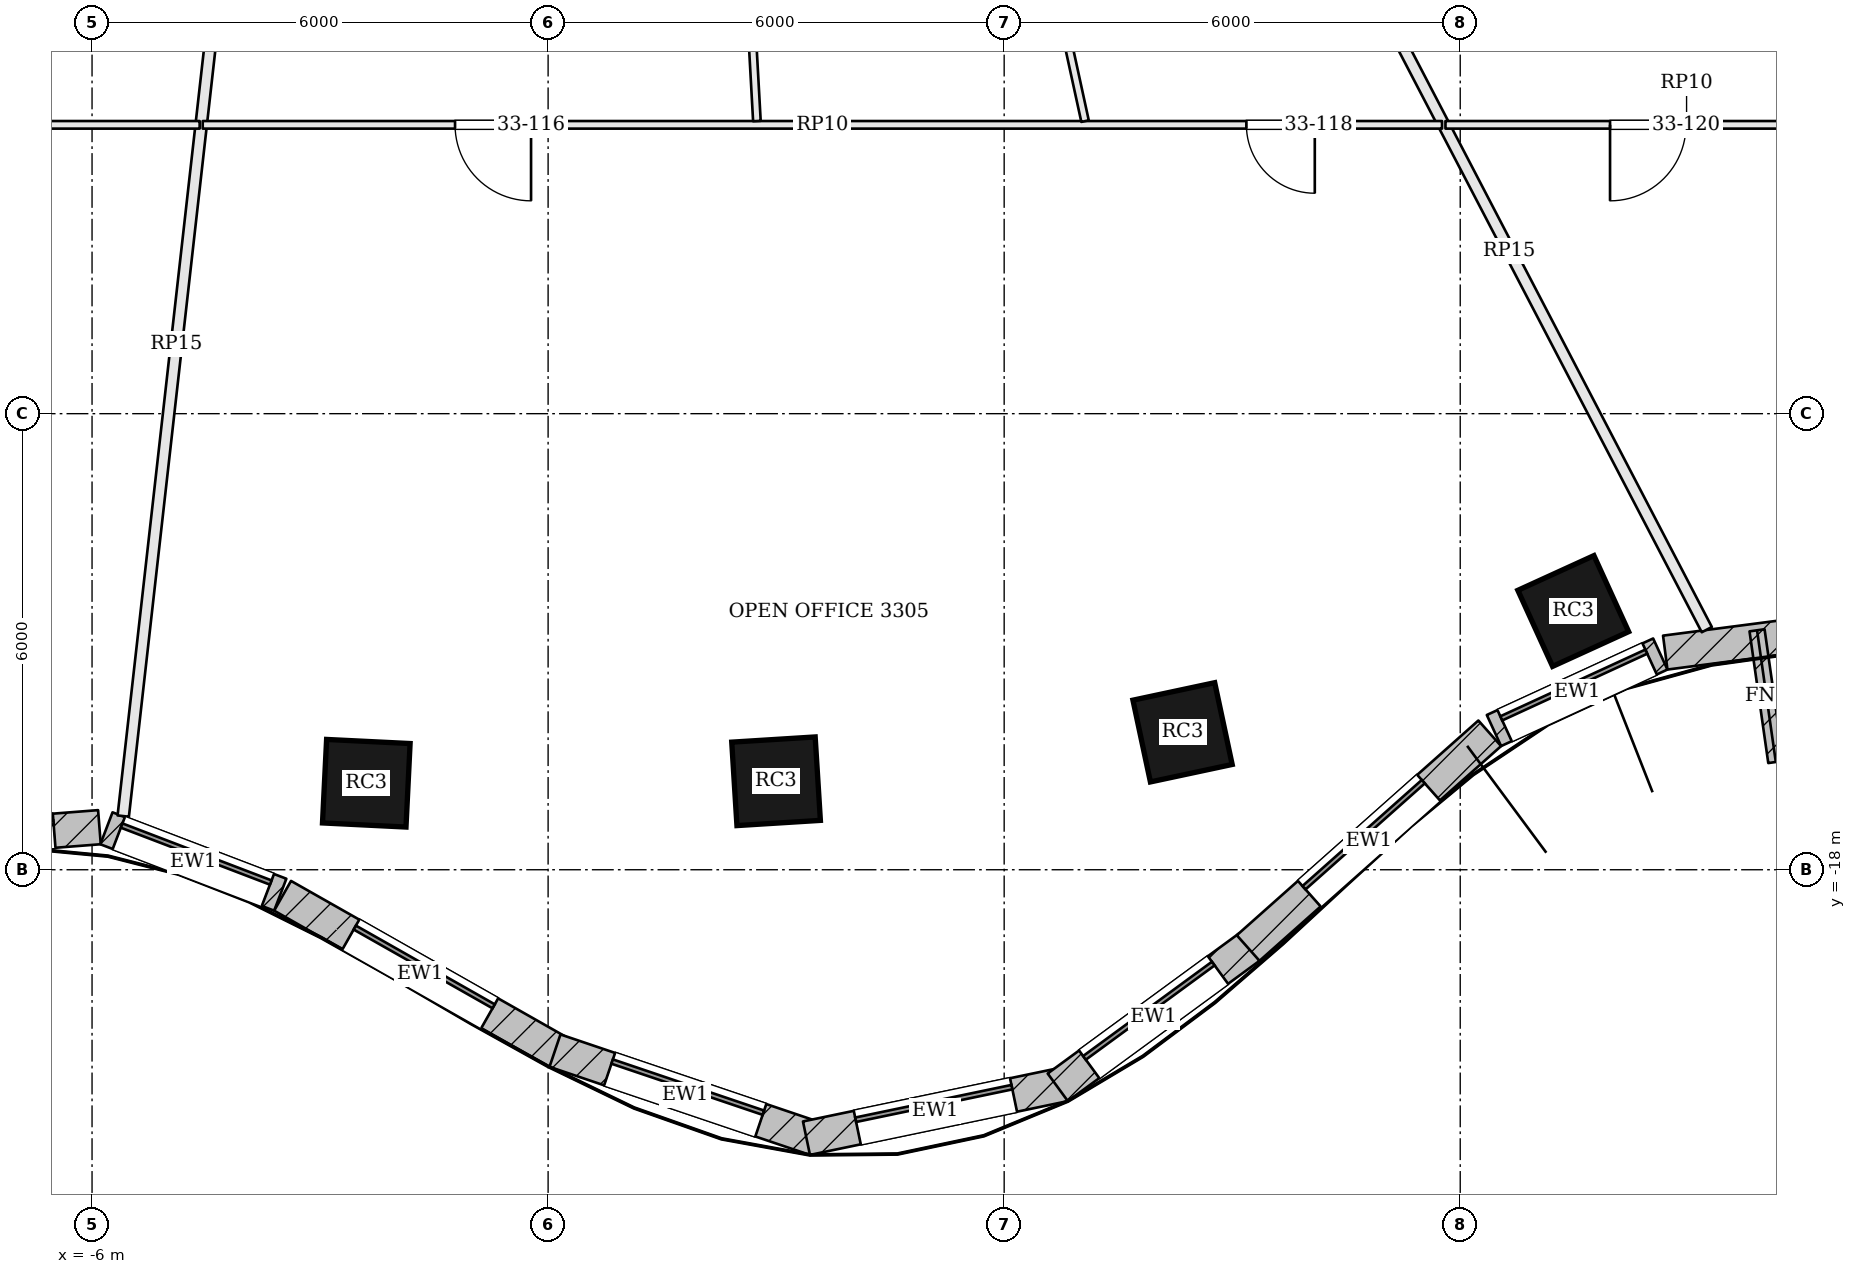
"""IFC4 building model, lengths in metres.
Left out: names, types, materials, properties, quantities, classifications, styles, units other than length and angle.
Written with IfcOpenShell. Run it as: python <this file> out.ifc"""

import sys

from ifc_helpers import new_model, si_unit, direction, frame, frame_2d, origin, origin_2d, place, context, subcontext, project, spatial, rectangle, extrude, element, fill, save


model = new_model("IFC4")
c1 = context("Model", 3, precision=1e-05, world=origin(), true_north=direction((0.0, 1.0)))
c2 = subcontext(c1, "Body", "Model", "MODEL_VIEW")
j1 = project(units=[si_unit("LENGTHUNIT", "METRE"), si_unit("PLANEANGLEUNIT", "RADIAN")], contexts=[c1])
p1 = place(None, origin())
s1 = spatial("IfcSite", under=j1, at=p1, CompositionType="ELEMENT")
p2 = place(p1, origin())
s2 = spatial("IfcBuilding", under=s1, at=p2, CompositionType="ELEMENT")
p3 = place(p2, frame((0.0, 0.0, 138.3)))
s3 = spatial("IfcBuildingStorey", under=s2, at=p3, CompositionType="ELEMENT", Elevation=138.3)
for number, where, z_axis, x_axis in (
    (1, (-2.392, -16.862, 0.0), (0.0, 0.0, 1.0), (0.999, -0.049, 0.0)),
    (2, (2.999, -16.836, 0.0), (0.0, 0.0, 1.0), (0.998, 0.062, 0.0)),
    (3, (8.347, -16.192, 0.0), (0.0, 0.0, 1.0), (0.978, 0.209, 0.0)),
    (4, (13.487, -14.596, 0.0), (0.0, 0.0, 1.0), (0.91, 0.415, 0.0)),
):
    element("IfcColumn", number, at=place(p3, frame(where, z_axis=z_axis, x_axis=x_axis)), inside=s3, PredefinedType="COLUMN", context=c2, shape_type="SweptSolid", body=[
        extrude(rectangle(XDim=1.1, YDim=1.1, at=origin_2d()), origin(), (0.0, 0.0, 1.0), 3.9),
    ])
p4 = place(p3, frame((-9.188, -17.697, 0.0), z_axis=(0.0, 0.0, 1.0), x_axis=(0.996964028691, 0.077863505548, 0.0)))
e5 = element("IfcWall", 5, at=p4, inside=s3, PredefinedType="SOLIDWALL", context=c2, shape_type="SweptSolid", body=[
    extrude(rectangle(XDim=3.295, YDim=0.45, at=frame_2d((1.648, 0.0))), origin(), (0.0, 0.0, 1.0), 3.7),
])
p5 = place(p4, frame((0.598, 0.0, 0.9)))
e6 = element("IfcOpeningElement", 6, at=p5, cuts=e5, PredefinedType="OPENING", context=c2, shape_type="SweptSolid", body=[
    extrude(rectangle(XDim=2.1, YDim=2.3, at=frame_2d((1.05, 1.15))), frame((0.0, 0.235, 0.0), z_axis=(0.0, -1.0, 0.0), x_axis=(1.0, 0.0, 0.0)), (0.0, 0.0, 1.0), 0.47),
])
p6 = place(p3, frame((-5.811, -17.455, 0.0), z_axis=(0.0, 0.0, 1.0), x_axis=(0.934122271306, -0.35695319336, 0.0)))
e7 = element("IfcWall", 7, at=p6, inside=s3, PredefinedType="SOLIDWALL", context=c2, shape_type="SweptSolid", body=[
    extrude(rectangle(XDim=2.448, YDim=0.45, at=frame_2d((1.224, 0.0))), origin(), (0.0, 0.0, 1.0), 3.7),
])
p7 = place(p6, frame((0.174, 0.0, 0.9)))
e8 = element("IfcOpeningElement", 8, at=p7, cuts=e7, PredefinedType="OPENING", context=c2, shape_type="SweptSolid", body=[
    extrude(rectangle(XDim=2.1, YDim=2.3, at=frame_2d((1.05, 1.15))), frame((0.0, 0.235, 0.0), z_axis=(0.0, -1.0, 0.0), x_axis=(1.0, 0.0, 0.0)), (0.0, 0.0, 1.0), 0.47),
])
p8 = place(p3, frame((-3.493, -18.343, 0.0), z_axis=(0.0, 0.0, 1.0), x_axis=(0.869825988853, -0.493358641473, 0.0)))
e9 = element("IfcWall", 9, at=p8, inside=s3, PredefinedType="SOLIDWALL", context=c2, shape_type="SweptSolid", body=[
    extrude(rectangle(XDim=4.165, YDim=0.45, at=frame_2d((2.083, 0.0))), origin(), (0.0, 0.0, 1.0), 3.7),
])
p9 = place(p8, frame((1.032, 0.0, 0.9)))
e10 = element("IfcOpeningElement", 10, at=p9, cuts=e9, PredefinedType="OPENING", context=c2, shape_type="SweptSolid", body=[
    extrude(rectangle(XDim=2.1, YDim=2.3, at=frame_2d((1.05, 1.15))), frame((0.0, 0.235, 0.0), z_axis=(0.0, -1.0, 0.0), x_axis=(1.0, 0.0, 0.0)), (0.0, 0.0, 1.0), 0.47),
])
p10 = place(p3, frame((0.091, -20.38, 0.0), z_axis=(0.0, 0.0, 1.0), x_axis=(0.947304227221, -0.320335294791, 0.0)))
e11 = element("IfcWall", 11, at=p10, inside=s3, PredefinedType="SOLIDWALL", context=c2, shape_type="SweptSolid", body=[
    extrude(rectangle(XDim=3.617, YDim=0.45, at=frame_2d((1.809, 0.0))), origin(), (0.0, 0.0, 1.0), 3.7),
])
p11 = place(p10, frame((0.759, 0.0, 0.9)))
e12 = element("IfcOpeningElement", 12, at=p11, cuts=e11, PredefinedType="OPENING", context=c2, shape_type="SweptSolid", body=[
    extrude(rectangle(XDim=2.1, YDim=2.3, at=frame_2d((1.05, 1.15))), frame((0.0, 0.235, 0.0), z_axis=(0.0, -1.0, 0.0), x_axis=(1.0, 0.0, 0.0)), (0.0, 0.0, 1.0), 0.47),
])
p12 = place(p3, frame((3.399, -21.532, 0.0), z_axis=(0.0, 0.0, 1.0), x_axis=(0.978915912181, 0.204263645512, 0.0)))
e13 = element("IfcWall", 13, at=p12, inside=s3, PredefinedType="SOLIDWALL", context=c2, shape_type="SweptSolid", body=[
    extrude(rectangle(XDim=3.466, YDim=0.45, at=frame_2d((1.733, 0.0))), origin(), (0.0, 0.0, 1.0), 3.7),
])
p13 = place(p12, frame((0.683, 0.0, 0.9)))
e14 = element("IfcOpeningElement", 14, at=p13, cuts=e13, PredefinedType="OPENING", context=c2, shape_type="SweptSolid", body=[
    extrude(rectangle(XDim=2.1, YDim=2.3, at=frame_2d((1.05, 1.15))), frame((0.0, 0.235, 0.0), z_axis=(0.0, -1.0, 0.0), x_axis=(1.0, 0.0, 0.0)), (0.0, 0.0, 1.0), 0.47),
])
p14 = place(p3, frame((6.705, -20.862, 0.0), z_axis=(0.0, 0.0, 1.0), x_axis=(0.806921336267, 0.590658917716, 0.0)))
e15 = element("IfcWall", 15, at=p14, inside=s3, PredefinedType="SOLIDWALL", context=c2, shape_type="SweptSolid", body=[
    extrude(rectangle(XDim=3.125, YDim=0.45, at=frame_2d((1.562, 0.0))), origin(), (0.0, 0.0, 1.0), 3.7),
])
p15 = place(p14, frame((0.512, 0.0, 0.9)))
e16 = element("IfcOpeningElement", 16, at=p15, cuts=e15, PredefinedType="OPENING", context=c2, shape_type="SweptSolid", body=[
    extrude(rectangle(XDim=2.1, YDim=2.3, at=frame_2d((1.05, 1.15))), frame((0.0, 0.235, 0.0), z_axis=(0.0, -1.0, 0.0), x_axis=(1.0, 0.0, 0.0)), (0.0, 0.0, 1.0), 0.47),
])
p16 = place(p3, frame((9.21, -19.03, 0.0), z_axis=(0.0, 0.0, 1.0), x_axis=(0.747396648191, 0.664378092861, 0.0)))
e17 = element("IfcWall", 17, at=p16, inside=s3, PredefinedType="SOLIDWALL", context=c2, shape_type="SweptSolid", body=[
    extrude(rectangle(XDim=4.252, YDim=0.45, at=frame_2d((2.126, 0.0))), origin(), (0.0, 0.0, 1.0), 3.7),
])
p17 = place(p16, frame((1.076, 0.0, 0.9)))
e18 = element("IfcOpeningElement", 18, at=p17, cuts=e17, PredefinedType="OPENING", context=c2, shape_type="SweptSolid", body=[
    extrude(rectangle(XDim=2.1, YDim=2.3, at=frame_2d((1.05, 1.15))), frame((0.0, 0.235, 0.0), z_axis=(0.0, -1.0, 0.0), x_axis=(1.0, 0.0, 0.0)), (0.0, 0.0, 1.0), 0.47),
])
p18 = place(p3, frame((12.444, -16.169, 0.0), z_axis=(0.0, 0.0, 1.0), x_axis=(0.908468904074, 0.417952449844, 0.0)))
e19 = element("IfcWall", 19, at=p18, inside=s3, PredefinedType="SOLIDWALL", context=c2, shape_type="SweptSolid", body=[
    extrude(rectangle(XDim=2.409, YDim=0.45, at=frame_2d((1.205, 0.0))), origin(), (0.0, 0.0, 1.0), 3.7),
])
p19 = place(p18, frame((0.155, 0.0, 0.9)))
e20 = element("IfcOpeningElement", 20, at=p19, cuts=e19, PredefinedType="OPENING", context=c2, shape_type="SweptSolid", body=[
    extrude(rectangle(XDim=2.1, YDim=2.3, at=frame_2d((1.05, 1.15))), frame((0.0, 0.235, 0.0), z_axis=(0.0, -1.0, 0.0), x_axis=(1.0, 0.0, 0.0)), (0.0, 0.0, 1.0), 0.47),
])
p20 = place(p3, frame((14.697, -15.143, 0.0), z_axis=(0.0, 0.0, 1.0), x_axis=(0.991631798411, 0.129098320597, 0.0)))
e21 = element("IfcWall", 21, at=p20, inside=s3, PredefinedType="SOLIDWALL", context=c2, shape_type="SweptSolid", body=[
    extrude(rectangle(XDim=5.547, YDim=0.45, at=frame_2d((2.773, 0.0))), origin(), (0.0, 0.0, 1.0), 3.7),
])
p21 = place(p20, frame((1.723, 0.0, 0.9)))
e22 = element("IfcOpeningElement", 22, at=p21, cuts=e21, PredefinedType="OPENING", context=c2, shape_type="SweptSolid", body=[
    extrude(rectangle(XDim=2.1, YDim=2.3, at=frame_2d((1.05, 1.15))), frame((0.0, 0.235, 0.0), z_axis=(0.0, -1.0, 0.0), x_axis=(1.0, 0.0, 0.0)), (0.0, 0.0, 1.0), 0.47),
])
p22 = place(p3, frame((15.905, -14.85, 0.0), z_axis=(0.0, 0.0, 1.0), x_axis=(0.140913490987, -0.990021912918, 0.0)))
e23 = element("IfcWall", 23, at=p22, inside=s3, PredefinedType="SOLIDWALL", context=c2, shape_type="SweptSolid", body=[
    extrude(rectangle(XDim=1.75, YDim=0.2, at=frame_2d((0.875, 0.0))), origin(), (0.0, 0.0, 1.0), 3.7),
])
p23 = place(p3, frame((-5.59, -17.294, 0.0), z_axis=(0.0, 0.0, 1.0), x_axis=(0.112047950982, 0.993702800983, 0.0)))
e24 = element("IfcWall", 24, at=p23, inside=s3, PredefinedType="PARTITIONING", context=c2, shape_type="SweptSolid", body=[
    extrude(rectangle(XDim=12.498, YDim=0.15, at=frame_2d((6.249, 0.0))), origin(), (0.0, 0.0, 1.0), 3.198),
])
p24 = place(p3, frame((15.244, -14.841, 0.0), z_axis=(0.0, 0.0, 1.0), x_axis=(-0.46213645011, 0.88680883029, 0.0)))
e25 = element("IfcWall", 25, at=p24, inside=s3, PredefinedType="PARTITIONING", context=c2, shape_type="SweptSolid", body=[
    extrude(rectangle(XDim=11.248, YDim=0.15, at=frame_2d((5.624, 0.0))), origin(), (0.0, 0.0, 1.0), 3.198),
])
p25 = place(p3, frame((-4.584, -8.2, 0.0), z_axis=(0.0, 0.0, 1.0), x_axis=(-1.0, 0.0, 0.0)))
e26 = element("IfcWall", 26, at=p25, inside=s3, PredefinedType="PARTITIONING", context=c2, shape_type="SweptSolid", body=[
    extrude(rectangle(XDim=13.566, YDim=0.1, at=frame_2d((6.783, 0.0))), origin(), (0.0, 0.0, 1.0), 3.184),
])
p26 = place(p3, frame((-6.453, -4.873, 0.0), z_axis=(0.0, 0.0, 1.0), x_axis=(-0.21917670953, -0.975685179758, 0.0)))
e27 = element("IfcWall", 27, at=p26, inside=s3, PredefinedType="PARTITIONING", context=c2, shape_type="SweptSolid", body=[
    extrude(rectangle(XDim=3.36, YDim=0.1, at=frame_2d((1.68, 0.0))), origin(), (0.0, 0.0, 1.0), 3.184),
])
p27 = place(p3, frame((11.76, -8.2, 0.0), z_axis=(0.0, 0.0, 1.0), x_axis=(-1.0, 0.0, 0.0)))
e28 = element("IfcWall", 28, at=p27, inside=s3, PredefinedType="PARTITIONING", context=c2, shape_type="SweptSolid", body=[
    extrude(rectangle(XDim=16.305, YDim=0.1, at=frame_2d((8.152, 0.0))), origin(), (0.0, 0.0, 1.0), 3.184),
])
p28 = place(p27, frame((11.985, 0.0, 0.0)))
e29 = element("IfcOpeningElement", 29, at=p28, cuts=e28, PredefinedType="OPENING", context=c2, shape_type="SweptSolid", body=[
    extrude(rectangle(XDim=1.0, YDim=2.1, at=frame_2d((0.5, 1.05))), frame((0.0, 0.06, 0.0), z_axis=(0.0, -1.0, 0.0), x_axis=(1.0, 0.0, 0.0)), (0.0, 0.0, 1.0), 0.12),
])
p29 = place(p27, frame((1.674, 0.0, 0.0)))
e30 = element("IfcOpeningElement", 30, at=p29, cuts=e28, PredefinedType="OPENING", context=c2, shape_type="SweptSolid", body=[
    extrude(rectangle(XDim=0.9, YDim=2.1, at=frame_2d((0.45, 1.05))), frame((0.0, 0.06, 0.0), z_axis=(0.0, -1.0, 0.0), x_axis=(1.0, 0.0, 0.0)), (0.0, 0.0, 1.0), 0.12),
])
p30 = place(p3, frame((2.566, -4.875, 0.0), z_axis=(0.0, 0.0, 1.0), x_axis=(0.05515260166, -0.998477936927, 0.0)))
e31 = element("IfcWall", 31, at=p30, inside=s3, PredefinedType="PARTITIONING", context=c2, shape_type="SweptSolid", body=[
    extrude(rectangle(XDim=3.28, YDim=0.1, at=frame_2d((1.64, 0.0))), origin(), (0.0, 0.0, 1.0), 3.184),
])
p31 = place(p3, frame((6.35, -4.873, 0.0), z_axis=(0.0, 0.0, 1.0), x_axis=(0.213006668545, -0.977050745435, 0.0)))
e32 = element("IfcWall", 32, at=p31, inside=s3, PredefinedType="PARTITIONING", context=c2, shape_type="SweptSolid", body=[
    extrude(rectangle(XDim=3.355, YDim=0.1, at=frame_2d((1.677, 0.0))), origin(), (0.0, 0.0, 1.0), 3.184),
])
p32 = place(p3, frame((18.15, -8.2, 0.0), z_axis=(0.0, 0.0, 1.0), x_axis=(-1.0, 0.0, 0.0)))
e33 = element("IfcWall", 33, at=p32, inside=s3, PredefinedType="PARTITIONING", context=c2, shape_type="SweptSolid", body=[
    extrude(rectangle(XDim=6.344, YDim=0.1, at=frame_2d((3.172, 0.0))), origin(), (0.0, 0.0, 1.0), 3.184),
])
p33 = place(p32, frame((3.179, 0.0, 0.0)))
e34 = element("IfcOpeningElement", 34, at=p33, cuts=e33, PredefinedType="OPENING", context=c2, shape_type="SweptSolid", body=[
    extrude(rectangle(XDim=1.0, YDim=2.1, at=frame_2d((0.5, 1.05))), frame((0.0, 0.06, 0.0), z_axis=(0.0, -1.0, 0.0), x_axis=(1.0, 0.0, 0.0)), (0.0, 0.0, 1.0), 0.12),
])
p34 = place(p3, frame((13.896, -4.844, 0.0), z_axis=(0.0, 0.0, 1.0), x_axis=(0.810468668719, -0.585781987624, 0.0)))
e35 = element("IfcWall", 35, at=p34, inside=s3, PredefinedType="PARTITIONING", context=c2, shape_type="SweptSolid", body=[
    extrude(rectangle(XDim=5.26, YDim=0.1, at=frame_2d((2.63, 0.0))), origin(), (0.0, 0.0, 1.0), 3.184),
])
p35 = place(p5, origin())
e36 = element("IfcWindow", 36, at=p35, inside=s3, PartitioningType="SINGLE_PANEL", PredefinedType="WINDOW", context=c2, shape_type="SweptSolid", body=[
    extrude(rectangle(XDim=2.1, YDim=2.3, at=frame_2d((1.05, 1.15))), frame((0.0, 0.135, 0.0), z_axis=(0.0, -1.0, 0.0), x_axis=(1.0, 0.0, 0.0)), (0.0, 0.0, 1.0), 0.06),
])
fill(e6, e36)
p36 = place(p7, origin())
e37 = element("IfcWindow", 37, at=p36, inside=s3, PartitioningType="SINGLE_PANEL", PredefinedType="WINDOW", context=c2, shape_type="SweptSolid", body=[
    extrude(rectangle(XDim=2.1, YDim=2.3, at=frame_2d((1.05, 1.15))), frame((0.0, 0.135, 0.0), z_axis=(0.0, -1.0, 0.0), x_axis=(1.0, 0.0, 0.0)), (0.0, 0.0, 1.0), 0.06),
])
fill(e8, e37)
p37 = place(p9, origin())
e38 = element("IfcWindow", 38, at=p37, inside=s3, PartitioningType="SINGLE_PANEL", PredefinedType="WINDOW", context=c2, shape_type="SweptSolid", body=[
    extrude(rectangle(XDim=2.1, YDim=2.3, at=frame_2d((1.05, 1.15))), frame((0.0, 0.135, 0.0), z_axis=(0.0, -1.0, 0.0), x_axis=(1.0, 0.0, 0.0)), (0.0, 0.0, 1.0), 0.06),
])
fill(e10, e38)
p38 = place(p11, origin())
e39 = element("IfcWindow", 39, at=p38, inside=s3, PartitioningType="SINGLE_PANEL", PredefinedType="WINDOW", context=c2, shape_type="SweptSolid", body=[
    extrude(rectangle(XDim=2.1, YDim=2.3, at=frame_2d((1.05, 1.15))), frame((0.0, 0.135, 0.0), z_axis=(0.0, -1.0, 0.0), x_axis=(1.0, 0.0, 0.0)), (0.0, 0.0, 1.0), 0.06),
])
fill(e12, e39)
p39 = place(p13, origin())
e40 = element("IfcWindow", 40, at=p39, inside=s3, PartitioningType="SINGLE_PANEL", PredefinedType="WINDOW", context=c2, shape_type="SweptSolid", body=[
    extrude(rectangle(XDim=2.1, YDim=2.3, at=frame_2d((1.05, 1.15))), frame((0.0, 0.135, 0.0), z_axis=(0.0, -1.0, 0.0), x_axis=(1.0, 0.0, 0.0)), (0.0, 0.0, 1.0), 0.06),
])
fill(e14, e40)
p40 = place(p15, origin())
e41 = element("IfcWindow", 41, at=p40, inside=s3, PartitioningType="SINGLE_PANEL", PredefinedType="WINDOW", context=c2, shape_type="SweptSolid", body=[
    extrude(rectangle(XDim=2.1, YDim=2.3, at=frame_2d((1.05, 1.15))), frame((0.0, 0.135, 0.0), z_axis=(0.0, -1.0, 0.0), x_axis=(1.0, 0.0, 0.0)), (0.0, 0.0, 1.0), 0.06),
])
fill(e16, e41)
p41 = place(p17, origin())
e42 = element("IfcWindow", 42, at=p41, inside=s3, PartitioningType="SINGLE_PANEL", PredefinedType="WINDOW", context=c2, shape_type="SweptSolid", body=[
    extrude(rectangle(XDim=2.1, YDim=2.3, at=frame_2d((1.05, 1.15))), frame((0.0, 0.135, 0.0), z_axis=(0.0, -1.0, 0.0), x_axis=(1.0, 0.0, 0.0)), (0.0, 0.0, 1.0), 0.06),
])
fill(e18, e42)
p42 = place(p19, origin())
e43 = element("IfcWindow", 43, at=p42, inside=s3, PartitioningType="SINGLE_PANEL", PredefinedType="WINDOW", context=c2, shape_type="SweptSolid", body=[
    extrude(rectangle(XDim=2.1, YDim=2.3, at=frame_2d((1.05, 1.15))), frame((0.0, 0.135, 0.0), z_axis=(0.0, -1.0, 0.0), x_axis=(1.0, 0.0, 0.0)), (0.0, 0.0, 1.0), 0.06),
])
fill(e20, e43)
p43 = place(p28, origin())
e44 = element("IfcDoor", 44, at=p43, inside=s3, OperationType="SINGLE_SWING_LEFT", PredefinedType="DOOR", context=c2, shape_type="SweptSolid", body=[
    extrude(rectangle(XDim=1.0, YDim=2.1, at=frame_2d((0.5, 1.05))), frame((0.0, 0.025, 0.0), z_axis=(0.0, -1.0, 0.0), x_axis=(1.0, 0.0, 0.0)), (0.0, 0.0, 1.0), 0.05),
])
fill(e29, e44)
p44 = place(p29, origin())
e45 = element("IfcDoor", 45, at=p44, inside=s3, OperationType="SINGLE_SWING_LEFT", PredefinedType="DOOR", context=c2, shape_type="SweptSolid", body=[
    extrude(rectangle(XDim=0.9, YDim=2.1, at=frame_2d((0.45, 1.05))), frame((0.0, 0.025, 0.0), z_axis=(0.0, -1.0, 0.0), x_axis=(1.0, 0.0, 0.0)), (0.0, 0.0, 1.0), 0.05),
])
fill(e30, e45)
p45 = place(p33, origin())
e46 = element("IfcDoor", 46, at=p45, inside=s3, OperationType="SINGLE_SWING_RIGHT", PredefinedType="DOOR", context=c2, shape_type="SweptSolid", body=[
    extrude(rectangle(XDim=1.0, YDim=2.1, at=frame_2d((0.5, 1.05))), frame((0.0, 0.025, 0.0), z_axis=(0.0, -1.0, 0.0), x_axis=(1.0, 0.0, 0.0)), (0.0, 0.0, 1.0), 0.05),
])
fill(e34, e46)
save(model, sys.argv[1])
